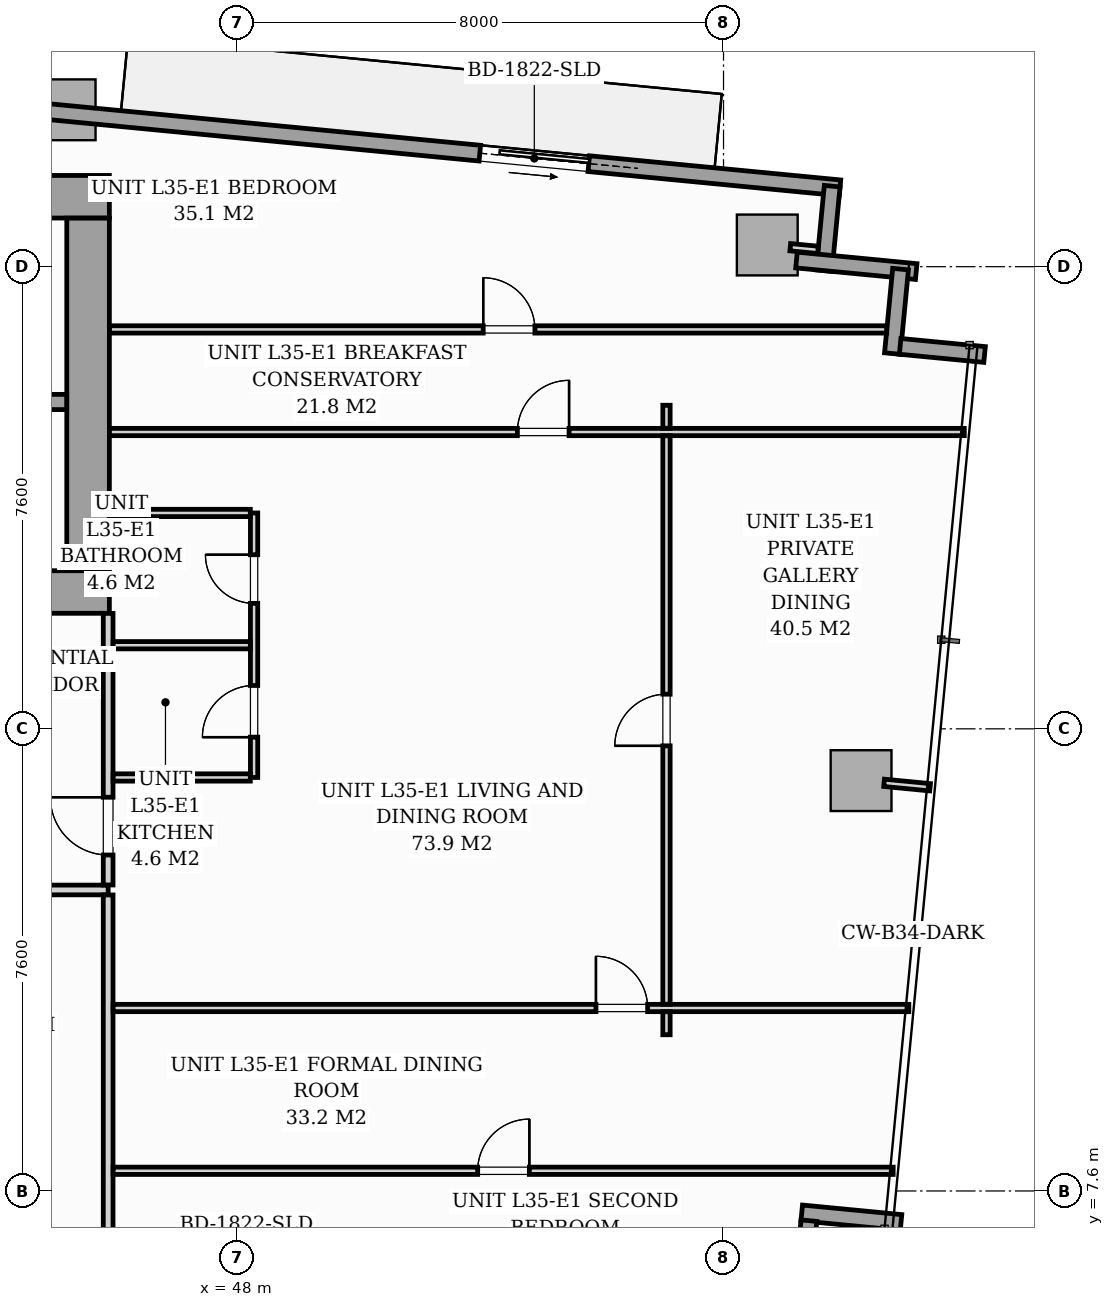
"""IFC4 building model, lengths in metres.
Left out: names, types, materials, properties, quantities, classifications, styles, units other than length and angle.
Written with IfcOpenShell. Run it as: python <this file> out.ifc"""

import sys

from ifc_helpers import new_model, si_unit, direction, frame, frame_2d, origin, origin_2d, place, context, subcontext, project, spatial, rectangle, i_section, extrude, source, transform, mapped, element, fill, save


model = new_model("IFC4")
c1 = context("Model", 3, precision=1e-05, world=origin(), true_north=direction((0.0, 1.0)))
c2 = subcontext(c1, "Body", "Model", "MODEL_VIEW")
j1 = project(units=[si_unit("LENGTHUNIT", "METRE"), si_unit("PLANEANGLEUNIT", "RADIAN")], contexts=[c1])
p1 = place(None, origin())
s1 = spatial("IfcSite", under=j1, at=p1, CompositionType="ELEMENT")
p2 = place(p1, origin())
s2 = spatial("IfcBuilding", under=s1, at=p2, CompositionType="ELEMENT")
p3 = place(p2, frame((0.0, 0.0, 124.6)))
s3 = spatial("IfcBuildingStorey", under=s2, at=p3, CompositionType="ELEMENT", Elevation=124.6)
m1 = source(origin(), c2, "Body", "SweptSolid", [
    extrude(i_section(OverallWidth=0.421, OverallDepth=0.465, WebThickness=0.045, FlangeThickness=0.073, FilletRadius=0.018, at=origin_2d()), origin(), (0.0, 0.0, 1.0), 3.196),
])
for number, where, z_axis, x_axis in (
    (1, (45.6, 17.4, 0.002), (0.0, 0.0, 1.0), (1.0, 0.0, 0.0)),
    (2, (45.6, 24.0, 0.002), (0.0, 0.0, 1.0), (1.0, 0.0, 0.0)),
):
    element("IfcColumn", number, at=place(p3, frame(where, z_axis=z_axis, x_axis=x_axis)), inside=s3, PredefinedType="PILASTER", context=c2, shape_type="MappedRepresentation", body=[
        mapped(m1, transform((0.0, 0.0, 0.0), scale=1.0)),
    ])
m2 = source(origin(), c2, "Body", "SweptSolid", [
    extrude(rectangle(XDim=1.0, YDim=1.0, at=origin_2d()), origin(), (0.0, 0.0, 1.0), 3.194),
])
for number, where, z_axis, x_axis in (
    (3, (45.173, 25.38, 0.004), (0.0, 0.0, 1.0), (0.995, -0.096, 0.0)),
    (4, (56.719, 23.157, 0.004), (0.0, 0.0, 1.0), (0.995, -0.096, 0.0)),
    (5, (58.262, 14.348, 0.004), (0.0, 0.0, 1.0), (0.995, -0.096, 0.0)),
):
    element("IfcColumn", number, at=place(p3, frame(where, z_axis=z_axis, x_axis=x_axis)), inside=s3, PredefinedType="COLUMN", context=c2, shape_type="MappedRepresentation", body=[
        mapped(m2, transform((0.0, 0.0, 0.0), scale=1.0)),
    ])
p4 = place(p3, frame((40.983, 25.727, 0.0), z_axis=(0.0, 0.0, 1.0), x_axis=(0.995395844771, -0.095849424686, 0.0)))
e6 = element("IfcWall", 6, at=p4, inside=s3, PredefinedType="STANDARD", context=c2, shape_type="SweptSolid", body=[
    extrude(rectangle(XDim=17.01, YDim=0.26, at=frame_2d((8.505, 0.0))), origin(), (0.0, 0.0, 1.0), 2.94),
])
p5 = place(p4, frame((11.06, 0.0, 0.0)))
e7 = element("IfcOpeningElement", 7, at=p5, cuts=e6, PredefinedType="OPENING", context=c2, shape_type="SweptSolid", body=[
    extrude(rectangle(XDim=1.8, YDim=2.06, at=frame_2d((0.9, 1.03))), frame((0.0, 0.14, 0.0), z_axis=(0.0, -1.0, 0.0), x_axis=(1.0, 0.0, 0.0)), (0.0, 0.0, 1.0), 0.28),
])
p6 = place(p4, frame((0.7, 0.0, 0.65)))
e8 = element("IfcOpeningElement", 8, at=p6, cuts=e6, PredefinedType="OPENING", context=c2, shape_type="SweptSolid", body=[
    extrude(rectangle(XDim=1.6, YDim=1.5, at=frame_2d((0.8, 0.75))), frame((0.0, 0.14, 0.0), z_axis=(0.0, -1.0, 0.0), x_axis=(1.0, 0.0, 0.0)), (0.0, 0.0, 1.0), 0.28),
])
p7 = place(p3, frame((57.787, 24.124, 0.0), z_axis=(0.0, 0.0, 1.0), x_axis=(-0.095915846097, -0.995389446633, 0.0)))
e9 = element("IfcWall", 9, at=p7, inside=s3, PredefinedType="STANDARD", context=c2, shape_type="SweptSolid", body=[
    extrude(rectangle(XDim=1.395, YDim=0.26, at=frame_2d((0.697, 0.0))), origin(), (0.0, 0.0, 1.0), 2.94),
])
p8 = place(p3, frame((57.2, 22.909, 0.0), z_axis=(0.0, 0.0, 1.0), x_axis=(0.995401789159, -0.095787672171, 0.0)))
e10 = element("IfcWall", 10, at=p8, inside=s3, PredefinedType="STANDARD", context=c2, shape_type="SweptSolid", body=[
    extrude(rectangle(XDim=1.978, YDim=0.26, at=frame_2d((0.989, 0.0))), origin(), (0.0, 0.0, 1.0), 2.94),
])
for number, where, z_axis, x_axis in (
    (11, (58.912, 22.76, 0.0), (0.0, 0.0, 1.0), (-0.096, -0.995, 0.0)),
    (12, (58.905, 21.49, 0.0), (0.0, 0.0, 1.0), (0.995, -0.096, 0.0)),
):
    element("IfcWall", number, at=place(p3, frame(where, z_axis=z_axis, x_axis=x_axis)), inside=s3, PredefinedType="STANDARD", context=c2, shape_type="SweptSolid", body=[
        extrude(rectangle(XDim=1.395, YDim=0.26, at=frame_2d((0.698, 0.0))), origin(), (0.0, 0.0, 1.0), 2.94),
    ])
p9 = place(p3, frame((58.919, 7.082, 0.0), z_axis=(0.0, 0.0, 1.0), x_axis=(-0.995393194909, 0.095876939504, 0.0)))
e13 = element("IfcWall", 13, at=p9, inside=s3, PredefinedType="STANDARD", context=c2, shape_type="SweptSolid", body=[
    extrude(rectangle(XDim=1.64, YDim=0.26, at=frame_2d((0.82, 0.0))), origin(), (0.0, 0.0, 1.0), 2.94),
])
p10 = place(p3, frame((57.405, 7.112, 0.0), z_axis=(0.0, 0.0, 1.0), x_axis=(-0.095971333708, -0.995384098279, 0.0)))
e14 = element("IfcWall", 14, at=p10, inside=s3, PredefinedType="STANDARD", context=c2, shape_type="SweptSolid", body=[
    extrude(rectangle(XDim=1.15, YDim=0.26, at=frame_2d((0.575, 0.0))), origin(), (0.0, 0.0, 1.0), 2.94),
])
p11 = place(p3, frame((26.1, 17.45, 0.0), z_axis=(0.0, 0.0, 1.0), x_axis=(1.0, 0.0, 0.0)))
e15 = element("IfcWall", 15, at=p11, inside=s3, PredefinedType="SHEAR", context=c2, shape_type="SweptSolid", body=[
    extrude(rectangle(XDim=19.8, YDim=0.7, at=frame_2d((9.9, 0.0))), origin(), (0.0, 0.0, 1.0), 3.2),
])
p12 = place(p11, frame((1.05, 0.0, 0.0)))
e16 = element("IfcOpeningElement", 16, at=p12, cuts=e15, PredefinedType="OPENING", context=c2, shape_type="SweptSolid", body=[
    extrude(rectangle(XDim=0.95, YDim=2.06, at=frame_2d((0.475, 1.03))), frame((0.0, 0.36, 0.0), z_axis=(0.0, -1.0, 0.0), x_axis=(1.0, 0.0, 0.0)), (0.0, 0.0, 1.0), 0.72),
])
p13 = place(p11, frame((9.48, 0.0, 0.0)))
e17 = element("IfcOpeningElement", 17, at=p13, cuts=e15, PredefinedType="OPENING", context=c2, shape_type="SweptSolid", body=[
    extrude(rectangle(XDim=0.85, YDim=2.0, at=frame_2d((0.425, 1.0))), frame((0.0, 0.36, 0.0), z_axis=(0.0, -1.0, 0.0), x_axis=(1.0, 0.0, 0.0)), (0.0, 0.0, 1.0), 0.72),
])
p14 = place(p11, frame((17.65, 0.0, 0.0)))
e18 = element("IfcOpeningElement", 18, at=p14, cuts=e15, PredefinedType="OPENING", context=c2, shape_type="SweptSolid", body=[
    extrude(rectangle(XDim=0.95, YDim=2.06, at=frame_2d((0.475, 1.03))), frame((0.0, 0.36, 0.0), z_axis=(0.0, -1.0, 0.0), x_axis=(1.0, 0.0, 0.0)), (0.0, 0.0, 1.0), 0.72),
])
p15 = place(p3, frame((26.1, 23.95, 0.0), z_axis=(0.0, 0.0, 1.0), x_axis=(1.0, 0.0, 0.0)))
e19 = element("IfcWall", 19, at=p15, inside=s3, PredefinedType="SHEAR", context=c2, shape_type="SweptSolid", body=[
    extrude(rectangle(XDim=19.8, YDim=0.7, at=frame_2d((9.9, 0.0))), origin(), (0.0, 0.0, 1.0), 3.2),
])
p16 = place(p3, frame((45.55, 17.802, 0.0), z_axis=(0.0, 0.0, 1.0), x_axis=(0.0, 1.0, 0.0)))
e20 = element("IfcWall", 20, at=p16, inside=s3, PredefinedType="SHEAR", context=c2, shape_type="SweptSolid", body=[
    extrude(rectangle(XDim=5.796, YDim=0.7, at=frame_2d((2.898, 0.0))), origin(), (0.0, 0.0, 1.0), 3.2),
])
p17 = place(p3, frame((37.05, 20.575, 0.0), z_axis=(0.0, 0.0, 1.0), x_axis=(1.0, 0.0, 0.0)))
e21 = element("IfcWall", 21, at=p17, inside=s3, PredefinedType="SOLIDWALL", context=c2, shape_type="SweptSolid", body=[
    extrude(rectangle(XDim=8.148, YDim=0.25, at=frame_2d((4.074, 0.0))), origin(), (0.0, 0.0, 1.0), 3.2),
])
p18 = place(p17, frame((6.6, 0.0, 0.0)))
e22 = element("IfcOpeningElement", 22, at=p18, cuts=e21, PredefinedType="OPENING", context=c2, shape_type="SweptSolid", body=[
    extrude(rectangle(XDim=0.95, YDim=2.06, at=frame_2d((0.475, 1.03))), frame((0.0, 0.135, 0.0), z_axis=(0.0, -1.0, 0.0), x_axis=(1.0, 0.0, 0.0)), (0.0, 0.0, 1.0), 0.27),
])
p19 = place(p3, frame((22.05, 12.55, 0.0), z_axis=(0.0, 0.0, 1.0), x_axis=(1.0, 0.0, 0.0)))
e23 = element("IfcWall", 23, at=p19, inside=s3, PredefinedType="PARTITIONING", context=c2, shape_type="SweptSolid", body=[
    extrude(rectangle(XDim=23.83, YDim=0.16, at=frame_2d((11.915, 0.0))), origin(), (0.0, 0.0, 1.0), 2.94),
])
p20 = place(p19, frame((0.655, 0.0, 0.0)))
e24 = element("IfcOpeningElement", 24, at=p20, cuts=e23, PredefinedType="OPENING", context=c2, shape_type="SweptSolid", body=[
    extrude(rectangle(XDim=0.95, YDim=2.06, at=frame_2d((0.475, 1.03))), frame((0.0, 0.09, 0.0), z_axis=(0.0, -1.0, 0.0), x_axis=(1.0, 0.0, 0.0)), (0.0, 0.0, 1.0), 0.18),
])
p21 = place(p19, frame((12.04, 0.0, 0.0)))
e25 = element("IfcOpeningElement", 25, at=p21, cuts=e23, PredefinedType="OPENING", context=c2, shape_type="SweptSolid", body=[
    extrude(rectangle(XDim=0.95, YDim=2.06, at=frame_2d((0.475, 1.03))), frame((0.0, 0.09, 0.0), z_axis=(0.0, -1.0, 0.0), x_axis=(1.0, 0.0, 0.0)), (0.0, 0.0, 1.0), 0.18),
])
p22 = place(p3, frame((45.88, 5.958, 0.0), z_axis=(0.0, 0.0, 1.0), x_axis=(0.0, 1.0, 0.0)))
e26 = element("IfcWall", 26, at=p22, inside=s3, PredefinedType="PARTITIONING", context=c2, shape_type="SweptSolid", body=[
    extrude(rectangle(XDim=6.51, YDim=0.16, at=frame_2d((3.255, 0.0))), origin(), (0.0, 0.0, 1.0), 2.94),
])
p23 = place(p3, frame((45.88, 12.632, 0.0), z_axis=(0.0, 0.0, 1.0), x_axis=(0.0, 1.0, 0.0)))
e27 = element("IfcWall", 27, at=p23, inside=s3, PredefinedType="PARTITIONING", context=c2, shape_type="SweptSolid", body=[
    extrude(rectangle(XDim=4.466, YDim=0.16, at=frame_2d((2.233, 0.0))), origin(), (0.0, 0.0, 1.0), 2.94),
])
p24 = place(p23, frame((0.493, 0.0, 0.0)))
e28 = element("IfcOpeningElement", 28, at=p24, cuts=e27, PredefinedType="OPENING", context=c2, shape_type="SweptSolid", body=[
    extrude(rectangle(XDim=0.95, YDim=2.06, at=frame_2d((0.475, 1.03))), frame((0.0, 0.09, 0.0), z_axis=(0.0, -1.0, 0.0), x_axis=(1.0, 0.0, 0.0)), (0.0, 0.0, 1.0), 0.18),
])
p25 = place(p3, frame((48.28, 14.4, 0.0), z_axis=(0.0, 0.0, 1.0), x_axis=(0.0, 1.0, 0.0)))
e29 = element("IfcWall", 29, at=p25, inside=s3, PredefinedType="PARTITIONING", context=c2, shape_type="SweptSolid", body=[
    extrude(rectangle(XDim=4.35, YDim=0.12, at=frame_2d((2.175, 0.0))), origin(), (0.0, 0.0, 1.0), 2.94),
])
p26 = place(p25, frame((0.663, 0.0, 0.0)))
e30 = element("IfcOpeningElement", 30, at=p26, cuts=e29, PredefinedType="OPENING", context=c2, shape_type="SweptSolid", body=[
    extrude(rectangle(XDim=0.85, YDim=2.05, at=frame_2d((0.425, 1.025))), frame((0.0, 0.07, 0.0), z_axis=(0.0, -1.0, 0.0), x_axis=(1.0, 0.0, 0.0)), (0.0, 0.0, 1.0), 0.14),
])
p27 = place(p25, frame((2.863, 0.0, 0.0)))
e31 = element("IfcOpeningElement", 31, at=p27, cuts=e29, PredefinedType="OPENING", context=c2, shape_type="SweptSolid", body=[
    extrude(rectangle(XDim=0.8, YDim=2.02, at=frame_2d((0.4, 1.01))), frame((0.0, 0.07, 0.0), z_axis=(0.0, -1.0, 0.0), x_axis=(1.0, 0.0, 0.0)), (0.0, 0.0, 1.0), 0.14),
])
for number, where, z_axis, x_axis in (
    (32, (45.962, 16.575, 0.0), (0.0, 0.0, 1.0), (1.0, 0.0, 0.0)),
    (33, (45.962, 14.4, 0.0), (0.0, 0.0, 1.0), (1.0, 0.0, 0.0)),
):
    element("IfcWall", number, at=place(p3, frame(where, z_axis=z_axis, x_axis=x_axis)), inside=s3, PredefinedType="PARTITIONING", context=c2, shape_type="SweptSolid", body=[
        extrude(rectangle(XDim=2.256, YDim=0.12, at=frame_2d((1.128, 0.0))), origin(), (0.0, 0.0, 1.0), 2.94),
    ])
p28 = place(p3, frame((45.902, 18.75, 0.0), z_axis=(0.0, 0.0, 1.0), x_axis=(1.0, 0.0, 0.0)))
e34 = element("IfcWall", 34, at=p28, inside=s3, PredefinedType="PARTITIONING", context=c2, shape_type="SweptSolid", body=[
    extrude(rectangle(XDim=2.316, YDim=0.12, at=frame_2d((1.158, 0.0))), origin(), (0.0, 0.0, 1.0), 2.94),
])
p29 = place(p3, frame((45.902, 21.768, 0.0), z_axis=(0.0, 0.0, 1.0), x_axis=(1.0, 0.0, 0.0)))
e35 = element("IfcWall", 35, at=p29, inside=s3, PredefinedType="PARTITIONING", context=c2, shape_type="SweptSolid", body=[
    extrude(rectangle(XDim=12.781, YDim=0.12, at=frame_2d((6.391, 0.0))), origin(), (0.0, 0.0, 1.0), 2.94),
])
p30 = place(p29, frame((6.146, 0.0, 0.0)))
e36 = element("IfcOpeningElement", 36, at=p30, cuts=e35, PredefinedType="OPENING", context=c2, shape_type="SweptSolid", body=[
    extrude(rectangle(XDim=0.85, YDim=2.05, at=frame_2d((0.425, 1.025))), frame((0.0, 0.07, 0.0), z_axis=(0.0, -1.0, 0.0), x_axis=(1.0, 0.0, 0.0)), (0.0, 0.0, 1.0), 0.14),
])
p31 = place(p3, frame((45.962, 7.932, 0.0), z_axis=(0.0, 0.0, 1.0), x_axis=(1.0, 0.0, 0.0)))
e37 = element("IfcWall", 37, at=p31, inside=s3, PredefinedType="PARTITIONING", context=c2, shape_type="SweptSolid", body=[
    extrude(rectangle(XDim=12.828, YDim=0.12, at=frame_2d((6.414, 0.0))), origin(), (0.0, 0.0, 1.0), 2.94),
])
p32 = place(p31, frame((5.995, 0.0, 0.0)))
e38 = element("IfcOpeningElement", 38, at=p32, cuts=e37, PredefinedType="OPENING", context=c2, shape_type="SweptSolid", body=[
    extrude(rectangle(XDim=0.85, YDim=2.05, at=frame_2d((0.425, 1.025))), frame((0.0, 0.07, 0.0), z_axis=(0.0, -1.0, 0.0), x_axis=(1.0, 0.0, 0.0)), (0.0, 0.0, 1.0), 0.14),
])
p33 = place(p3, frame((45.962, 10.609, 0.0), z_axis=(0.0, 0.0, 1.0), x_axis=(1.0, 0.0, 0.0)))
e39 = element("IfcWall", 39, at=p33, inside=s3, PredefinedType="PARTITIONING", context=c2, shape_type="SweptSolid", body=[
    extrude(rectangle(XDim=13.085, YDim=0.12, at=frame_2d((6.543, 0.0))), origin(), (0.0, 0.0, 1.0), 2.94),
])
p34 = place(p33, frame((7.94, 0.0, 0.0)))
e40 = element("IfcOpeningElement", 40, at=p34, cuts=e39, PredefinedType="OPENING", context=c2, shape_type="SweptSolid", body=[
    extrude(rectangle(XDim=0.85, YDim=2.05, at=frame_2d((0.425, 1.025))), frame((0.0, 0.07, 0.0), z_axis=(0.0, -1.0, 0.0), x_axis=(1.0, 0.0, 0.0)), (0.0, 0.0, 1.0), 0.14),
])
p35 = place(p3, frame((45.902, 20.081, 0.0), z_axis=(0.0, 0.0, 1.0), x_axis=(1.0, 0.0, 0.0)))
e41 = element("IfcWall", 41, at=p35, inside=s3, PredefinedType="PARTITIONING", context=c2, shape_type="SweptSolid", body=[
    extrude(rectangle(XDim=14.057, YDim=0.12, at=frame_2d((7.029, 0.0))), origin(), (0.0, 0.0, 1.0), 2.94),
])
p36 = place(p35, frame((6.708, 0.0, 0.0)))
e42 = element("IfcOpeningElement", 42, at=p36, cuts=e41, PredefinedType="OPENING", context=c2, shape_type="SweptSolid", body=[
    extrude(rectangle(XDim=0.85, YDim=2.05, at=frame_2d((0.425, 1.025))), frame((0.0, 0.07, 0.0), z_axis=(0.0, -1.0, 0.0), x_axis=(1.0, 0.0, 0.0)), (0.0, 0.0, 1.0), 0.14),
])
p37 = place(p3, frame((55.062, 10.169, 0.0), z_axis=(0.0, 0.0, 1.0), x_axis=(0.0, 1.0, 0.0)))
e43 = element("IfcWall", 43, at=p37, inside=s3, PredefinedType="PARTITIONING", context=c2, shape_type="SweptSolid", body=[
    extrude(rectangle(XDim=0.378, YDim=0.12, at=frame_2d((0.189, 0.0))), origin(), (0.0, 0.0, 1.0), 2.94),
])
p38 = place(p3, frame((55.062, 10.671, 0.0), z_axis=(0.0, 0.0, 1.0), x_axis=(0.0, 1.0, 0.0)))
e44 = element("IfcWall", 44, at=p38, inside=s3, PredefinedType="PARTITIONING", context=c2, shape_type="SweptSolid", body=[
    extrude(rectangle(XDim=9.348, YDim=0.12, at=frame_2d((4.674, 0.0))), origin(), (0.0, 0.0, 1.0), 2.94),
])
p39 = place(p38, frame((4.249, 0.0, 0.0)))
e45 = element("IfcOpeningElement", 45, at=p39, cuts=e44, PredefinedType="OPENING", context=c2, shape_type="SweptSolid", body=[
    extrude(rectangle(XDim=0.85, YDim=2.05, at=frame_2d((0.425, 1.025))), frame((0.0, 0.07, 0.0), z_axis=(0.0, -1.0, 0.0), x_axis=(1.0, 0.0, 0.0)), (0.0, 0.0, 1.0), 0.14),
])
p40 = place(p3, frame((55.062, 20.143, 0.0), z_axis=(0.0, 0.0, 1.0), x_axis=(0.0, 1.0, 0.0)))
e46 = element("IfcWall", 46, at=p40, inside=s3, PredefinedType="PARTITIONING", context=c2, shape_type="SweptSolid", body=[
    extrude(rectangle(XDim=0.378, YDim=0.12, at=frame_2d((0.189, 0.0))), origin(), (0.0, 0.0, 1.0), 2.94),
])
p41 = place(p3, frame((57.098, 23.12, 0.0), z_axis=(0.0, 0.0, 1.0), x_axis=(0.995384576284, -0.09596637586, 0.0)))
e47 = element("IfcWall", 47, at=p41, inside=s3, PredefinedType="PARTITIONING", context=c2, shape_type="SweptSolid", body=[
    extrude(rectangle(XDim=0.458, YDim=0.12, at=frame_2d((0.229, 0.0))), origin(), (0.0, 0.0, 1.0), 2.94),
])
p42 = place(p3, frame((58.64, 14.312, 0.0), z_axis=(0.0, 0.0, 1.0), x_axis=(0.995377786728, -0.096036772582, 0.0)))
e48 = element("IfcWall", 48, at=p42, inside=s3, PredefinedType="PARTITIONING", context=c2, shape_type="SweptSolid", body=[
    extrude(rectangle(XDim=0.76, YDim=0.12, at=frame_2d((0.38, 0.0))), origin(), (0.0, 0.0, 1.0), 2.94),
])
m3 = source(origin(), c2, "Body", "SweptSolid", [
    extrude(rectangle(XDim=1.8, YDim=2.06, at=frame_2d((0.9, 1.03))), frame((0.0, 0.025, 0.0), z_axis=(0.0, -1.0, 0.0), x_axis=(1.0, 0.0, 0.0)), (0.0, 0.0, 1.0), 0.05),
])
p43 = place(p5, origin())
e49 = element("IfcDoor", 49, at=p43, inside=s3, OperationType="SLIDING_TO_RIGHT", PredefinedType="DOOR", context=c2, shape_type="MappedRepresentation", body=[
    mapped(m3, transform((0.0, 0.0, 0.0), scale=1.0)),
])
fill(e7, e49)
m4 = source(origin(), c2, "Body", "SweptSolid", [
    extrude(rectangle(XDim=0.95, YDim=2.06, at=frame_2d((0.475, 1.03))), frame((0.0, 0.025, 0.0), z_axis=(0.0, -1.0, 0.0), x_axis=(1.0, 0.0, 0.0)), (0.0, 0.0, 1.0), 0.05),
])
p44 = place(p24, origin())
e50 = element("IfcDoor", 50, at=p44, inside=s3, OperationType="SINGLE_SWING_RIGHT", PredefinedType="DOOR", context=c2, shape_type="MappedRepresentation", body=[
    mapped(m4, transform((0.0, 0.0, 0.0), scale=1.0)),
])
fill(e28, e50)
m5 = source(origin(), c2, "Body", "SweptSolid", [
    extrude(rectangle(XDim=0.85, YDim=2.05, at=frame_2d((0.425, 1.025))), frame((0.0, 0.025, 0.0), z_axis=(0.0, -1.0, 0.0), x_axis=(1.0, 0.0, 0.0)), (0.0, 0.0, 1.0), 0.05),
])
p45 = place(p26, origin())
e51 = element("IfcDoor", 51, at=p45, inside=s3, OperationType="SINGLE_SWING_LEFT", PredefinedType="DOOR", context=c2, shape_type="MappedRepresentation", body=[
    mapped(m5, transform((0.0, 0.0, 0.0), scale=1.0)),
])
fill(e30, e51)
m6 = source(origin(), c2, "Body", "SweptSolid", [
    extrude(rectangle(XDim=0.8, YDim=2.02, at=frame_2d((0.4, 1.01))), frame((0.0, 0.025, 0.0), z_axis=(0.0, -1.0, 0.0), x_axis=(1.0, 0.0, 0.0)), (0.0, 0.0, 1.0), 0.05),
])
p46 = place(p27, origin())
e52 = element("IfcDoor", 52, at=p46, inside=s3, OperationType="SINGLE_SWING_RIGHT", PredefinedType="DOOR", context=c2, shape_type="MappedRepresentation", body=[
    mapped(m6, transform((0.0, 0.0, 0.0), scale=1.0)),
])
fill(e31, e52)
p47 = place(p30, origin())
e53 = element("IfcDoor", 53, at=p47, inside=s3, OperationType="SINGLE_SWING_LEFT", PredefinedType="DOOR", context=c2, shape_type="MappedRepresentation", body=[
    mapped(m5, transform((0.0, 0.0, 0.0), scale=1.0)),
])
fill(e36, e53)
p48 = place(p32, origin())
e54 = element("IfcDoor", 54, at=p48, inside=s3, OperationType="SINGLE_SWING_RIGHT", PredefinedType="DOOR", context=c2, shape_type="MappedRepresentation", body=[
    mapped(m5, transform((0.0, 0.0, 0.0), scale=1.0)),
])
fill(e38, e54)
p49 = place(p34, origin())
e55 = element("IfcDoor", 55, at=p49, inside=s3, OperationType="SINGLE_SWING_LEFT", PredefinedType="DOOR", context=c2, shape_type="MappedRepresentation", body=[
    mapped(m5, transform((0.0, 0.0, 0.0), scale=1.0)),
])
fill(e40, e55)
p50 = place(p36, origin())
e56 = element("IfcDoor", 56, at=p50, inside=s3, OperationType="SINGLE_SWING_RIGHT", PredefinedType="DOOR", context=c2, shape_type="MappedRepresentation", body=[
    mapped(m5, transform((0.0, 0.0, 0.0), scale=1.0)),
])
fill(e42, e56)
p51 = place(p39, origin())
e57 = element("IfcDoor", 57, at=p51, inside=s3, OperationType="SINGLE_SWING_LEFT", PredefinedType="DOOR", context=c2, shape_type="MappedRepresentation", body=[
    mapped(m5, transform((0.0, 0.0, 0.0), scale=1.0)),
])
fill(e45, e57)
save(model, sys.argv[1])
